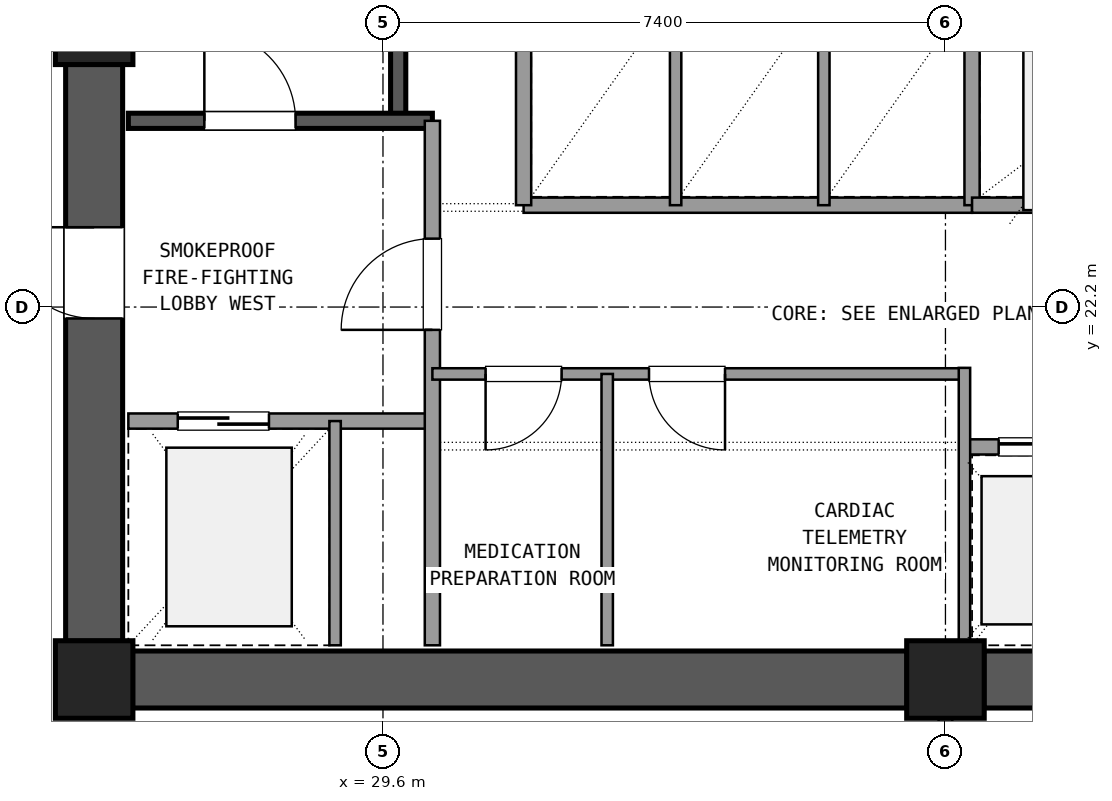
"""IFC4 building model, lengths in metres.
Left out: names, types, materials, properties, quantities, classifications, styles, units other than length and angle.
Written with IfcOpenShell. Run it as: python <this file> out.ifc"""

import sys

from ifc_helpers import new_model, si_unit, direction, frame, frame_2d, origin, origin_2d, place, context, subcontext, project, spatial, rectangle, extrude, element, fill, save


model = new_model("IFC4")
c1 = context("Model", 3, precision=1e-05, world=origin(), true_north=direction((0.0, 1.0)))
c2 = subcontext(c1, "Body", "Model", "MODEL_VIEW")
j1 = project(units=[si_unit("LENGTHUNIT", "METRE"), si_unit("PLANEANGLEUNIT", "RADIAN")], contexts=[c1])
p1 = place(None, origin())
s1 = spatial("IfcSite", under=j1, at=p1, CompositionType="ELEMENT")
p2 = place(p1, origin())
s2 = spatial("IfcBuilding", under=s1, at=p2, CompositionType="ELEMENT")
p3 = place(p2, frame((0.0, 0.0, 88.38)))
s3 = spatial("IfcBuildingStorey", under=s2, at=p3, CompositionType="ELEMENT", Elevation=88.38)
for number, where, z_axis, x_axis in (
    (1, (25.8, 17.3, 0.0), (0.0, 0.0, 1.0), (1.0, 0.0, 0.0)),
    (2, (37.0, 17.3, 0.0), (0.0, 0.0, 1.0), (1.0, 0.0, 0.0)),
    (3, (25.8, 25.9, 0.0), (0.0, 0.0, 1.0), (1.0, 0.0, 0.0)),
):
    element("IfcColumn", number, at=place(p3, frame(where, z_axis=z_axis, x_axis=x_axis)), inside=s3, PredefinedType="COLUMN", context=c2, shape_type="SweptSolid", body=[
        extrude(rectangle(XDim=1.02, YDim=1.02, at=origin_2d()), origin(), (0.0, 0.0, 1.0), 3.6),
    ])
for number, where, z_axis, x_axis in (
    (4, (26.305, 17.3, 0.0), (0.0, 0.0, 1.0), (1.0, 0.0, 0.0)),
    (5, (37.505, 17.3, 0.0), (0.0, 0.0, 1.0), (1.0, 0.0, 0.0)),
):
    element("IfcWall", number, at=place(p3, frame(where, z_axis=z_axis, x_axis=x_axis)), inside=s3, PredefinedType="SHEAR", context=c2, shape_type="SweptSolid", body=[
        extrude(rectangle(XDim=10.19, YDim=0.75, at=frame_2d((5.095, 0.0))), origin(), (0.0, 0.0, 1.0), 3.32),
    ])
p4 = place(p3, frame((25.8, 25.395, 0.0), z_axis=(0.0, 0.0, 1.0), x_axis=(0.0, -1.0, 0.0)))
e6 = element("IfcWall", 6, at=p4, inside=s3, PredefinedType="SHEAR", context=c2, shape_type="SweptSolid", body=[
    extrude(rectangle(XDim=7.59, YDim=0.75, at=frame_2d((3.795, 0.0))), origin(), (0.0, 0.0, 1.0), 3.32),
])
p5 = place(p4, frame((2.145, 0.0, 0.0)))
e7 = element("IfcOpeningElement", 7, at=p5, cuts=e6, PredefinedType="OPENING", context=c2, shape_type="SweptSolid", body=[
    extrude(rectangle(XDim=1.2, YDim=2.15, at=frame_2d((0.6, 1.075))), frame((0.0, 0.385, 0.0), z_axis=(0.0, -1.0, 0.0), x_axis=(1.0, 0.0, 0.0)), (0.0, 0.0, 1.0), 0.77),
])
p6 = place(p3, frame((29.8, 24.65, 0.0), z_axis=(0.0, 0.0, 1.0), x_axis=(0.0, 1.0, 0.0)))
e8 = element("IfcWall", 8, at=p6, inside=s3, PredefinedType="SHEAR", context=c2, shape_type="SweptSolid", body=[
    extrude(rectangle(XDim=9.4, YDim=0.2, at=frame_2d((4.7, 0.0))), origin(), (0.0, 0.0, 1.0), 3.32),
])
p7 = place(p3, frame((26.25, 24.65, 0.0), z_axis=(0.0, 0.0, 1.0), x_axis=(1.0, 0.0, 0.0)))
e9 = element("IfcWall", 9, at=p7, inside=s3, PredefinedType="SHEAR", context=c2, shape_type="SweptSolid", body=[
    extrude(rectangle(XDim=4.0, YDim=0.2, at=frame_2d((2.0, 0.0))), origin(), (0.0, 0.0, 1.0), 3.32),
])
p8 = place(p7, frame((1.0, 0.0, 0.0)))
e10 = element("IfcOpeningElement", 10, at=p8, cuts=e9, PredefinedType="OPENING", context=c2, shape_type="SweptSolid", body=[
    extrude(rectangle(XDim=1.2, YDim=2.15, at=frame_2d((0.6, 1.075))), frame((0.0, 0.11, 0.0), z_axis=(0.0, -1.0, 0.0), x_axis=(1.0, 0.0, 0.0)), (0.0, 0.0, 1.0), 0.22),
])
p9 = place(p3, frame((26.25, 20.7, 0.0), z_axis=(0.0, 0.0, 1.0), x_axis=(1.0, 0.0, 0.0)))
e11 = element("IfcWall", 11, at=p9, inside=s3, PredefinedType="SOLIDWALL", context=c2, shape_type="SweptSolid", body=[
    extrude(rectangle(XDim=4.0, YDim=0.2, at=frame_2d((2.0, 0.0))), origin(), (0.0, 0.0, 1.0), 2.61),
])
p10 = place(p9, frame((0.65, 0.0, 0.0)))
e12 = element("IfcOpeningElement", 12, at=p10, cuts=e11, PredefinedType="OPENING", context=c2, shape_type="SweptSolid", body=[
    extrude(rectangle(XDim=1.2, YDim=2.15, at=frame_2d((0.6, 1.075))), frame((0.0, 0.11, 0.0), z_axis=(0.0, -1.0, 0.0), x_axis=(1.0, 0.0, 0.0)), (0.0, 0.0, 1.0), 0.22),
])
p11 = place(p3, frame((30.25, 17.75, 0.0), z_axis=(0.0, 0.0, 1.0), x_axis=(0.0, 1.0, 0.0)))
e13 = element("IfcWall", 13, at=p11, inside=s3, PredefinedType="SOLIDWALL", context=c2, shape_type="SweptSolid", body=[
    extrude(rectangle(XDim=6.9, YDim=0.2, at=frame_2d((3.45, 0.0))), origin(), (0.0, 0.0, 1.0), 2.61),
])
p12 = place(p11, frame((4.15, 0.0, 0.0)))
e14 = element("IfcOpeningElement", 14, at=p12, cuts=e13, PredefinedType="OPENING", context=c2, shape_type="SweptSolid", body=[
    extrude(rectangle(XDim=1.2, YDim=2.15, at=frame_2d((0.6, 1.075))), frame((0.0, 0.11, 0.0), z_axis=(0.0, -1.0, 0.0), x_axis=(1.0, 0.0, 0.0)), (0.0, 0.0, 1.0), 0.22),
])
p13 = place(p3, frame((28.97, 17.75, 0.0), z_axis=(0.0, 0.0, 1.0), x_axis=(0.0, 1.0, 0.0)))
e15 = element("IfcWall", 15, at=p13, inside=s3, PredefinedType="PARTITIONING", context=c2, shape_type="SweptSolid", body=[
    extrude(rectangle(XDim=2.95, YDim=0.15, at=frame_2d((1.475, 0.0))), origin(), (0.0, 0.0, 1.0), 2.61),
])
p14 = place(p3, frame((30.25, 21.32, 0.0), z_axis=(0.0, 0.0, 1.0), x_axis=(1.0, 0.0, 0.0)))
e16 = element("IfcWall", 16, at=p14, inside=s3, PredefinedType="PARTITIONING", context=c2, shape_type="SweptSolid", body=[
    extrude(rectangle(XDim=7.0, YDim=0.15, at=frame_2d((3.5, 0.0))), origin(), (0.0, 0.0, 1.0), 2.61),
])
p15 = place(p14, frame((0.7, 0.0, 0.0)))
e17 = element("IfcOpeningElement", 17, at=p15, cuts=e16, PredefinedType="OPENING", context=c2, shape_type="SweptSolid", body=[
    extrude(rectangle(XDim=1.0, YDim=2.15, at=frame_2d((0.5, 1.075))), frame((0.0, 0.085, 0.0), z_axis=(0.0, -1.0, 0.0), x_axis=(1.0, 0.0, 0.0)), (0.0, 0.0, 1.0), 0.17),
])
p16 = place(p14, frame((2.85, 0.0, 0.0)))
e18 = element("IfcOpeningElement", 18, at=p16, cuts=e16, PredefinedType="OPENING", context=c2, shape_type="SweptSolid", body=[
    extrude(rectangle(XDim=1.0, YDim=2.15, at=frame_2d((0.5, 1.075))), frame((0.0, 0.085, 0.0), z_axis=(0.0, -1.0, 0.0), x_axis=(1.0, 0.0, 0.0)), (0.0, 0.0, 1.0), 0.17),
])
p17 = place(p3, frame((32.55, 17.75, 0.0), z_axis=(0.0, 0.0, 1.0), x_axis=(0.0, 1.0, 0.0)))
e19 = element("IfcWall", 19, at=p17, inside=s3, PredefinedType="PARTITIONING", context=c2, shape_type="SweptSolid", body=[
    extrude(rectangle(XDim=3.57, YDim=0.15, at=frame_2d((1.785, 0.0))), origin(), (0.0, 0.0, 1.0), 2.61),
])
p18 = place(p3, frame((37.25, 20.36, 0.0), z_axis=(0.0, 0.0, 1.0), x_axis=(1.0, 0.0, 0.0)))
e20 = element("IfcWall", 20, at=p18, inside=s3, PredefinedType="SOLIDWALL", context=c2, shape_type="SweptSolid", body=[
    extrude(rectangle(XDim=6.1, YDim=0.2, at=frame_2d((3.05, 0.0))), origin(), (0.0, 0.0, 1.0), 2.61),
])
p19 = place(p18, frame((0.45, 0.0, 0.0)))
e21 = element("IfcOpeningElement", 21, at=p19, cuts=e20, PredefinedType="OPENING", context=c2, shape_type="SweptSolid", body=[
    extrude(rectangle(XDim=1.1, YDim=2.15, at=frame_2d((0.55, 1.075))), frame((0.0, 0.11, 0.0), z_axis=(0.0, -1.0, 0.0), x_axis=(1.0, 0.0, 0.0)), (0.0, 0.0, 1.0), 0.22),
])
p20 = place(p18, frame((2.5, 0.0, 0.0)))
e22 = element("IfcOpeningElement", 22, at=p20, cuts=e20, PredefinedType="OPENING", context=c2, shape_type="SweptSolid", body=[
    extrude(rectangle(XDim=1.1, YDim=2.15, at=frame_2d((0.55, 1.075))), frame((0.0, 0.11, 0.0), z_axis=(0.0, -1.0, 0.0), x_axis=(1.0, 0.0, 0.0)), (0.0, 0.0, 1.0), 0.22),
])
p21 = place(p18, frame((4.55, 0.0, 0.0)))
e23 = element("IfcOpeningElement", 23, at=p21, cuts=e20, PredefinedType="OPENING", context=c2, shape_type="SweptSolid", body=[
    extrude(rectangle(XDim=1.1, YDim=2.15, at=frame_2d((0.55, 1.075))), frame((0.0, 0.11, 0.0), z_axis=(0.0, -1.0, 0.0), x_axis=(1.0, 0.0, 0.0)), (0.0, 0.0, 1.0), 0.22),
])
p22 = place(p3, frame((37.25, 17.75, 0.0), z_axis=(0.0, 0.0, 1.0), x_axis=(0.0, 1.0, 0.0)))
e24 = element("IfcWall", 24, at=p22, inside=s3, PredefinedType="PARTITIONING", context=c2, shape_type="SweptSolid", body=[
    extrude(rectangle(XDim=3.65, YDim=0.15, at=frame_2d((1.825, 0.0))), origin(), (0.0, 0.0, 1.0), 2.61),
])
p23 = place(p3, frame((31.45, 23.54, 0.0), z_axis=(0.0, 0.0, 1.0), x_axis=(1.0, 0.0, 0.0)))
e25 = element("IfcWall", 25, at=p23, inside=s3, PredefinedType="SOLIDWALL", context=c2, shape_type="SweptSolid", body=[
    extrude(rectangle(XDim=5.9, YDim=0.2, at=frame_2d((2.95, 0.0))), origin(), (0.0, 0.0, 1.0), 2.61),
])
p24 = place(p3, frame((31.45, 23.54, 0.0), z_axis=(0.0, 0.0, 1.0), x_axis=(0.0, 1.0, 0.0)))
e26 = element("IfcWall", 26, at=p24, inside=s3, PredefinedType="SOLIDWALL", context=c2, shape_type="SweptSolid", body=[
    extrude(rectangle(XDim=2.81, YDim=0.2, at=frame_2d((1.405, 0.0))), origin(), (0.0, 0.0, 1.0), 2.61),
])
for number, where, z_axis, x_axis in (
    (27, (33.45, 23.54, 0.0), (0.0, 0.0, 1.0), (0.0, 1.0, 0.0)),
    (28, (35.4, 23.54, 0.0), (0.0, 0.0, 1.0), (0.0, 1.0, 0.0)),
):
    element("IfcWall", number, at=place(p3, frame(where, z_axis=z_axis, x_axis=x_axis)), inside=s3, PredefinedType="PARTITIONING", context=c2, shape_type="SweptSolid", body=[
        extrude(rectangle(XDim=2.81, YDim=0.15, at=frame_2d((1.405, 0.0))), origin(), (0.0, 0.0, 1.0), 2.61),
    ])
p25 = place(p3, frame((37.35, 23.54, 0.0), z_axis=(0.0, 0.0, 1.0), x_axis=(0.0, 1.0, 0.0)))
e29 = element("IfcWall", 29, at=p25, inside=s3, PredefinedType="SOLIDWALL", context=c2, shape_type="SweptSolid", body=[
    extrude(rectangle(XDim=6.82, YDim=0.2, at=frame_2d((3.41, 0.0))), origin(), (0.0, 0.0, 1.0), 2.61),
])
p26 = place(p3, frame((37.35, 23.54, 0.0), z_axis=(0.0, 0.0, 1.0), x_axis=(1.0, 0.0, 0.0)))
e30 = element("IfcWall", 30, at=p26, inside=s3, PredefinedType="SOLIDWALL", context=c2, shape_type="SweptSolid", body=[
    extrude(rectangle(XDim=3.05, YDim=0.2, at=frame_2d((1.525, 0.0))), origin(), (0.0, 0.0, 1.0), 2.61),
])
p27 = place(p3, frame((37.0, 13.64, 0.0), z_axis=(0.0, 0.0, 1.0), x_axis=(0.0, 1.0, 0.0)))
e31 = element("IfcWall", 31, at=p27, inside=s3, PredefinedType="PARTITIONING", context=c2, shape_type="SweptSolid", body=[
    extrude(rectangle(XDim=3.21, YDim=0.18, at=frame_2d((1.605, 0.0))), origin(), (0.0, 0.0, 1.0), 2.61),
])
p28 = place(p27, frame((0.605, 0.0, 0.0)))
e32 = element("IfcOpeningElement", 32, at=p28, cuts=e31, PredefinedType="OPENING", context=c2, shape_type="SweptSolid", body=[
    extrude(rectangle(XDim=2.0, YDim=2.2, at=frame_2d((1.0, 1.1))), frame((0.0, 0.1, 0.0), z_axis=(0.0, -1.0, 0.0), x_axis=(1.0, 0.0, 0.0)), (0.0, 0.0, 1.0), 0.2),
])
p29 = place(p8, origin())
e33 = element("IfcDoor", 33, at=p29, inside=s3, OperationType="SINGLE_SWING_LEFT", PredefinedType="DOOR", context=c2, shape_type="SweptSolid", body=[
    extrude(rectangle(XDim=1.2, YDim=2.15, at=frame_2d((0.6, 1.075))), frame((0.0, 0.025, 0.0), z_axis=(0.0, -1.0, 0.0), x_axis=(1.0, 0.0, 0.0)), (0.0, 0.0, 1.0), 0.05),
])
fill(e10, e33)
p30 = place(p10, origin())
e34 = element("IfcDoor", 34, at=p30, inside=s3, OperationType="SLIDING_TO_LEFT", PredefinedType="DOOR", context=c2, shape_type="SweptSolid", body=[
    extrude(rectangle(XDim=1.2, YDim=2.15, at=frame_2d((0.6, 1.075))), frame((0.0, 0.025, 0.0), z_axis=(0.0, -1.0, 0.0), x_axis=(1.0, 0.0, 0.0)), (0.0, 0.0, 1.0), 0.05),
])
fill(e12, e34)
p31 = place(p12, origin())
e35 = element("IfcDoor", 35, at=p31, inside=s3, OperationType="SINGLE_SWING_LEFT", PredefinedType="DOOR", context=c2, shape_type="SweptSolid", body=[
    extrude(rectangle(XDim=1.2, YDim=2.15, at=frame_2d((0.6, 1.075))), frame((0.0, 0.025, 0.0), z_axis=(0.0, -1.0, 0.0), x_axis=(1.0, 0.0, 0.0)), (0.0, 0.0, 1.0), 0.05),
])
fill(e14, e35)
p32 = place(p5, frame((1.2, 0.0, 0.0), z_axis=(0.0, 0.0, 1.0), x_axis=(-1.0, 0.0, 0.0)))
e36 = element("IfcDoor", 36, at=p32, inside=s3, OperationType="SINGLE_SWING_LEFT", PredefinedType="DOOR", context=c2, shape_type="SweptSolid", body=[
    extrude(rectangle(XDim=1.2, YDim=2.15, at=frame_2d((0.6, 1.075))), frame((0.0, 0.025, 0.0), z_axis=(0.0, -1.0, 0.0), x_axis=(1.0, 0.0, 0.0)), (0.0, 0.0, 1.0), 0.05),
])
fill(e7, e36)
p33 = place(p15, frame((1.0, 0.0, 0.0), z_axis=(0.0, 0.0, 1.0), x_axis=(-1.0, 0.0, 0.0)))
e37 = element("IfcDoor", 37, at=p33, inside=s3, OperationType="SINGLE_SWING_LEFT", PredefinedType="DOOR", context=c2, shape_type="SweptSolid", body=[
    extrude(rectangle(XDim=1.0, YDim=2.15, at=frame_2d((0.5, 1.075))), frame((0.0, 0.025, 0.0), z_axis=(0.0, -1.0, 0.0), x_axis=(1.0, 0.0, 0.0)), (0.0, 0.0, 1.0), 0.05),
])
fill(e17, e37)
p34 = place(p16, frame((1.0, 0.0, 0.0), z_axis=(0.0, 0.0, 1.0), x_axis=(-1.0, 0.0, 0.0)))
e38 = element("IfcDoor", 38, at=p34, inside=s3, OperationType="SINGLE_SWING_RIGHT", PredefinedType="DOOR", context=c2, shape_type="SweptSolid", body=[
    extrude(rectangle(XDim=1.0, YDim=2.15, at=frame_2d((0.5, 1.075))), frame((0.0, 0.025, 0.0), z_axis=(0.0, -1.0, 0.0), x_axis=(1.0, 0.0, 0.0)), (0.0, 0.0, 1.0), 0.05),
])
fill(e18, e38)
p35 = place(p19, origin())
e39 = element("IfcDoor", 39, at=p35, inside=s3, OperationType="SLIDING_TO_LEFT", PredefinedType="DOOR", context=c2, shape_type="SweptSolid", body=[
    extrude(rectangle(XDim=1.1, YDim=2.15, at=frame_2d((0.55, 1.075))), frame((0.0, 0.025, 0.0), z_axis=(0.0, -1.0, 0.0), x_axis=(1.0, 0.0, 0.0)), (0.0, 0.0, 1.0), 0.05),
])
fill(e21, e39)
save(model, sys.argv[1])
